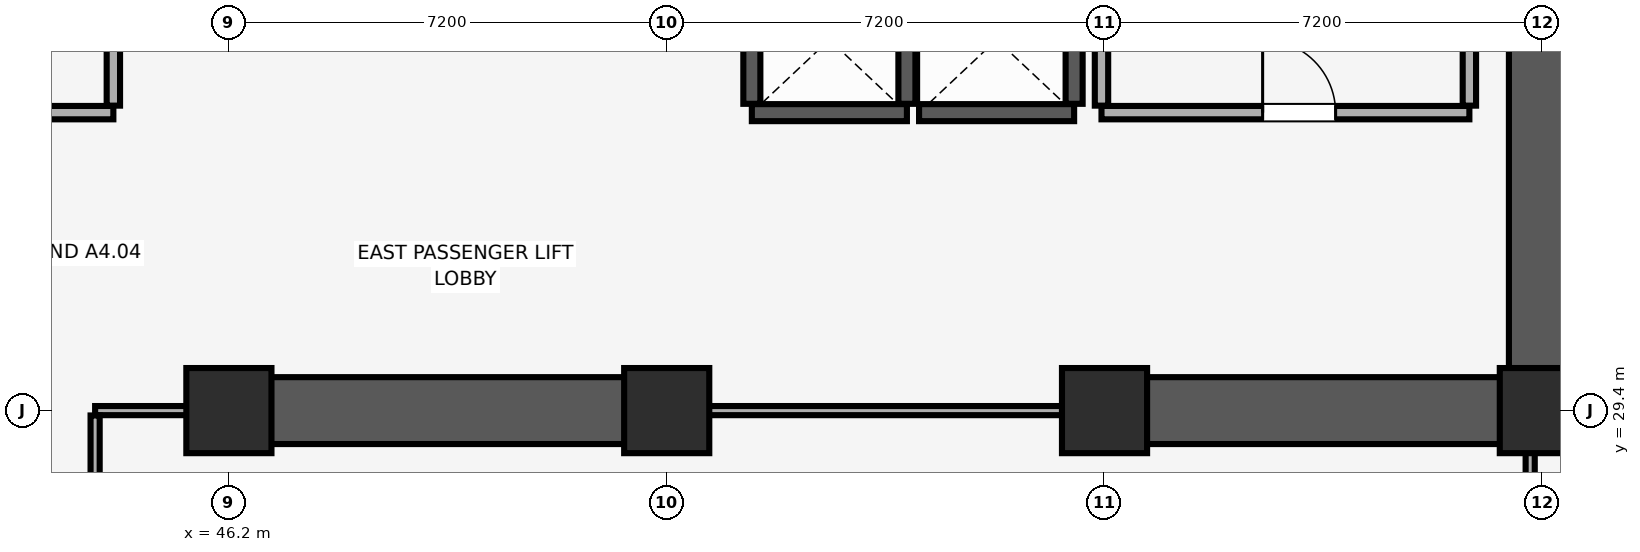
"""IFC4 building model, lengths in metres.
Left out: names, types, materials, properties, quantities, classifications, styles, units other than length and angle.
Written with IfcOpenShell. Run it as: python <this file> out.ifc"""

import sys

from ifc_helpers import new_model, si_unit, direction, frame, frame_2d, origin, origin_2d, place, context, subcontext, project, spatial, rectangle, extrude, element, fill, save


model = new_model("IFC4")
c1 = context("Model", 3, precision=1e-05, world=origin(), true_north=direction((0.0, 1.0)))
c2 = subcontext(c1, "Body", "Model", "MODEL_VIEW")
j1 = project(units=[si_unit("LENGTHUNIT", "METRE"), si_unit("PLANEANGLEUNIT", "RADIAN")], contexts=[c1])
p1 = place(None, origin())
s1 = spatial("IfcSite", under=j1, at=p1, CompositionType="ELEMENT")
p2 = place(p1, origin())
s2 = spatial("IfcBuilding", under=s1, at=p2, CompositionType="ELEMENT")
p3 = place(p2, frame((0.0, 0.0, 19.4)))
s3 = spatial("IfcBuildingStorey", under=s2, at=p3, CompositionType="ELEMENT", Elevation=19.4)
for number, where, z_axis, x_axis in (
    (1, (46.2, 29.4, 0.0), (0.0, 0.0, 1.0), (1.0, 0.0, 0.0)),
    (2, (53.4, 29.4, 0.0), (0.0, 0.0, 1.0), (1.0, 0.0, 0.0)),
    (3, (60.6, 29.4, 0.0), (0.0, 0.0, 1.0), (1.0, 0.0, 0.0)),
    (4, (67.8, 29.4, 0.0), (0.0, 0.0, 1.0), (1.0, 0.0, 0.0)),
):
    element("IfcColumn", number, at=place(p3, frame(where, z_axis=z_axis, x_axis=x_axis)), inside=s3, PredefinedType="COLUMN", context=c2, shape_type="SweptSolid", body=[
        extrude(rectangle(XDim=1.4, YDim=1.4, at=origin_2d()), origin(), (0.0, 0.0, 1.0), 6.28),
    ])
p4 = place(p3, frame((67.8, 29.4, 0.0), z_axis=(0.0, 0.0, 1.0), x_axis=(0.0, 1.0, 0.0)))
e5 = element("IfcWall", 5, at=p4, inside=s3, PredefinedType="SHEAR", context=c2, shape_type="SweptSolid", body=[
    extrude(rectangle(XDim=19.2, YDim=1.1, at=frame_2d((9.6, 0.0))), origin(), (0.0, 0.0, 1.0), 6.28),
])
p5 = place(p3, frame((46.0, 29.4, 0.0), z_axis=(0.0, 0.0, 1.0), x_axis=(1.0, 0.0, 0.0)))
e6 = element("IfcWall", 6, at=p5, inside=s3, PredefinedType="SHEAR", context=c2, shape_type="SweptSolid", body=[
    extrude(rectangle(XDim=7.6, YDim=1.1, at=frame_2d((3.8, 0.0))), origin(), (0.0, 0.0, 1.0), 6.28),
])
p6 = place(p3, frame((60.4, 29.4, 0.0), z_axis=(0.0, 0.0, 1.0), x_axis=(1.0, 0.0, 0.0)))
e7 = element("IfcWall", 7, at=p6, inside=s3, PredefinedType="SHEAR", context=c2, shape_type="SweptSolid", body=[
    extrude(rectangle(XDim=6.845, YDim=1.1, at=frame_2d((3.423, 0.0))), origin(), (0.0, 0.0, 1.0), 6.28),
])
p7 = place(p3, frame((54.8, 34.3, 0.0), z_axis=(0.0, 0.0, 1.0), x_axis=(1.0, 0.0, 0.0)))
e8 = element("IfcWall", 8, at=p7, inside=s3, PredefinedType="SHEAR", context=c2, shape_type="SweptSolid", body=[
    extrude(rectangle(XDim=2.55, YDim=0.28, at=frame_2d((1.275, 0.0))), origin(), (0.0, 0.0, 1.0), 6.28),
])
for number, where, z_axis, x_axis in (
    (9, (54.8, 34.445, 0.0), (0.0, 0.0, 1.0), (0.0, 1.0, 0.0)),
    (10, (57.35, 34.445, 0.0), (0.0, 0.0, 1.0), (0.0, 1.0, 0.0)),
):
    element("IfcWall", number, at=place(p3, frame(where, z_axis=z_axis, x_axis=x_axis)), inside=s3, PredefinedType="SHEAR", context=c2, shape_type="SweptSolid", body=[
        extrude(rectangle(XDim=2.11, YDim=0.28, at=frame_2d((1.055, 0.0))), origin(), (0.0, 0.0, 1.0), 6.28),
    ])
p8 = place(p3, frame((57.55, 34.3, 0.0), z_axis=(0.0, 0.0, 1.0), x_axis=(1.0, 0.0, 0.0)))
e11 = element("IfcWall", 11, at=p8, inside=s3, PredefinedType="SHEAR", context=c2, shape_type="SweptSolid", body=[
    extrude(rectangle(XDim=2.55, YDim=0.28, at=frame_2d((1.275, 0.0))), origin(), (0.0, 0.0, 1.0), 6.28),
])
p9 = place(p3, frame((60.1, 34.445, 0.0), z_axis=(0.0, 0.0, 1.0), x_axis=(0.0, 1.0, 0.0)))
e12 = element("IfcWall", 12, at=p9, inside=s3, PredefinedType="SHEAR", context=c2, shape_type="SweptSolid", body=[
    extrude(rectangle(XDim=2.11, YDim=0.28, at=frame_2d((1.055, 0.0))), origin(), (0.0, 0.0, 1.0), 6.28),
])
p10 = place(p3, frame((60.55, 34.3, 0.0), z_axis=(0.0, 0.0, 1.0), x_axis=(1.0, 0.0, 0.0)))
e13 = element("IfcWall", 13, at=p10, inside=s3, PredefinedType="PARTITIONING", context=c2, shape_type="SweptSolid", body=[
    extrude(rectangle(XDim=6.05, YDim=0.22, at=frame_2d((3.025, 0.0))), origin(), (0.0, 0.0, 1.0), 6.28),
])
p11 = place(p10, frame((2.65, 0.0, 0.0)))
e14 = element("IfcOpeningElement", 14, at=p11, cuts=e13, PredefinedType="OPENING", context=c2, shape_type="SweptSolid", body=[
    extrude(rectangle(XDim=1.2, YDim=2.15, at=frame_2d((0.6, 1.075))), frame((0.0, 0.12, 0.0), z_axis=(0.0, -1.0, 0.0), x_axis=(1.0, 0.0, 0.0)), (0.0, 0.0, 1.0), 0.24),
])
p12 = place(p3, frame((60.55, 34.415, 0.0), z_axis=(0.0, 0.0, 1.0), x_axis=(0.0, 1.0, 0.0)))
e15 = element("IfcWall", 15, at=p12, inside=s3, PredefinedType="PARTITIONING", context=c2, shape_type="SweptSolid", body=[
    extrude(rectangle(XDim=5.64, YDim=0.22, at=frame_2d((2.82, 0.0))), origin(), (0.0, 0.0, 1.0), 6.28),
])
p13 = place(p3, frame((66.6, 34.415, 0.0), z_axis=(0.0, 0.0, 1.0), x_axis=(0.0, 1.0, 0.0)))
e16 = element("IfcWall", 16, at=p13, inside=s3, PredefinedType="PARTITIONING", context=c2, shape_type="SweptSolid", body=[
    extrude(rectangle(XDim=5.43, YDim=0.22, at=frame_2d((2.715, 0.0))), origin(), (0.0, 0.0, 1.0), 6.28),
])
p14 = place(p3, frame((39.7, 34.3, 0.0), z_axis=(0.0, 0.0, 1.0), x_axis=(1.0, 0.0, 0.0)))
e17 = element("IfcWall", 17, at=p14, inside=s3, PredefinedType="PARTITIONING", context=c2, shape_type="SweptSolid", body=[
    extrude(rectangle(XDim=4.6, YDim=0.22, at=frame_2d((2.3, 0.0))), origin(), (0.0, 0.0, 1.0), 6.28),
])
p15 = place(p14, frame((1.7, 0.0, 0.0)))
e18 = element("IfcOpeningElement", 18, at=p15, cuts=e17, PredefinedType="OPENING", context=c2, shape_type="SweptSolid", body=[
    extrude(rectangle(XDim=1.2, YDim=2.15, at=frame_2d((0.6, 1.075))), frame((0.0, 0.12, 0.0), z_axis=(0.0, -1.0, 0.0), x_axis=(1.0, 0.0, 0.0)), (0.0, 0.0, 1.0), 0.24),
])
p16 = place(p3, frame((44.3, 34.415, 0.0), z_axis=(0.0, 0.0, 1.0), x_axis=(0.0, 1.0, 0.0)))
e19 = element("IfcWall", 19, at=p16, inside=s3, PredefinedType="PARTITIONING", context=c2, shape_type="SweptSolid", body=[
    extrude(rectangle(XDim=5.785, YDim=0.22, at=frame_2d((2.893, 0.0))), origin(), (0.0, 0.0, 1.0), 6.28),
])
p17 = place(p3, frame((44.0, 29.4, 0.0), z_axis=(0.0, 0.0, 1.0), x_axis=(1.0, 0.0, 0.0)))
e20 = element("IfcWall", 20, at=p17, inside=s3, PredefinedType="PARTITIONING", context=c2, shape_type="SweptSolid", body=[
    extrude(rectangle(XDim=1.99, YDim=0.15, at=frame_2d((0.995, 0.0))), origin(), (0.0, 0.0, 1.0), 5.18),
])
p18 = place(p3, frame((53.61, 29.4, 0.0), z_axis=(0.0, 0.0, 1.0), x_axis=(1.0, 0.0, 0.0)))
e21 = element("IfcWall", 21, at=p18, inside=s3, PredefinedType="PARTITIONING", context=c2, shape_type="SweptSolid", body=[
    extrude(rectangle(XDim=6.78, YDim=0.15, at=frame_2d((3.39, 0.0))), origin(), (0.0, 0.0, 1.0), 5.18),
])
p19 = place(p3, frame((44.0, 25.48, 0.0), z_axis=(0.0, 0.0, 1.0), x_axis=(0.0, 1.0, 0.0)))
e22 = element("IfcWall", 22, at=p19, inside=s3, PredefinedType="PARTITIONING", context=c2, shape_type="SweptSolid", body=[
    extrude(rectangle(XDim=3.84, YDim=0.15, at=frame_2d((1.92, 0.0))), origin(), (0.0, 0.0, 1.0), 6.28),
])
p20 = place(p3, frame((67.6, 25.48, 0.0), z_axis=(0.0, 0.0, 1.0), x_axis=(0.0, 1.0, 0.0)))
e23 = element("IfcWall", 23, at=p20, inside=s3, PredefinedType="PARTITIONING", context=c2, shape_type="SweptSolid", body=[
    extrude(rectangle(XDim=3.91, YDim=0.15, at=frame_2d((1.955, 0.0))), origin(), (0.0, 0.0, 1.0), 5.68),
])
p21 = place(p11, origin())
e24 = element("IfcDoor", 24, at=p21, inside=s3, OperationType="SINGLE_SWING_LEFT", PredefinedType="DOOR", context=c2, shape_type="SweptSolid", body=[
    extrude(rectangle(XDim=1.2, YDim=2.15, at=frame_2d((0.6, 1.075))), frame((0.0, 0.025, 0.0), z_axis=(0.0, -1.0, 0.0), x_axis=(1.0, 0.0, 0.0)), (0.0, 0.0, 1.0), 0.05),
])
fill(e14, e24)
save(model, sys.argv[1])
